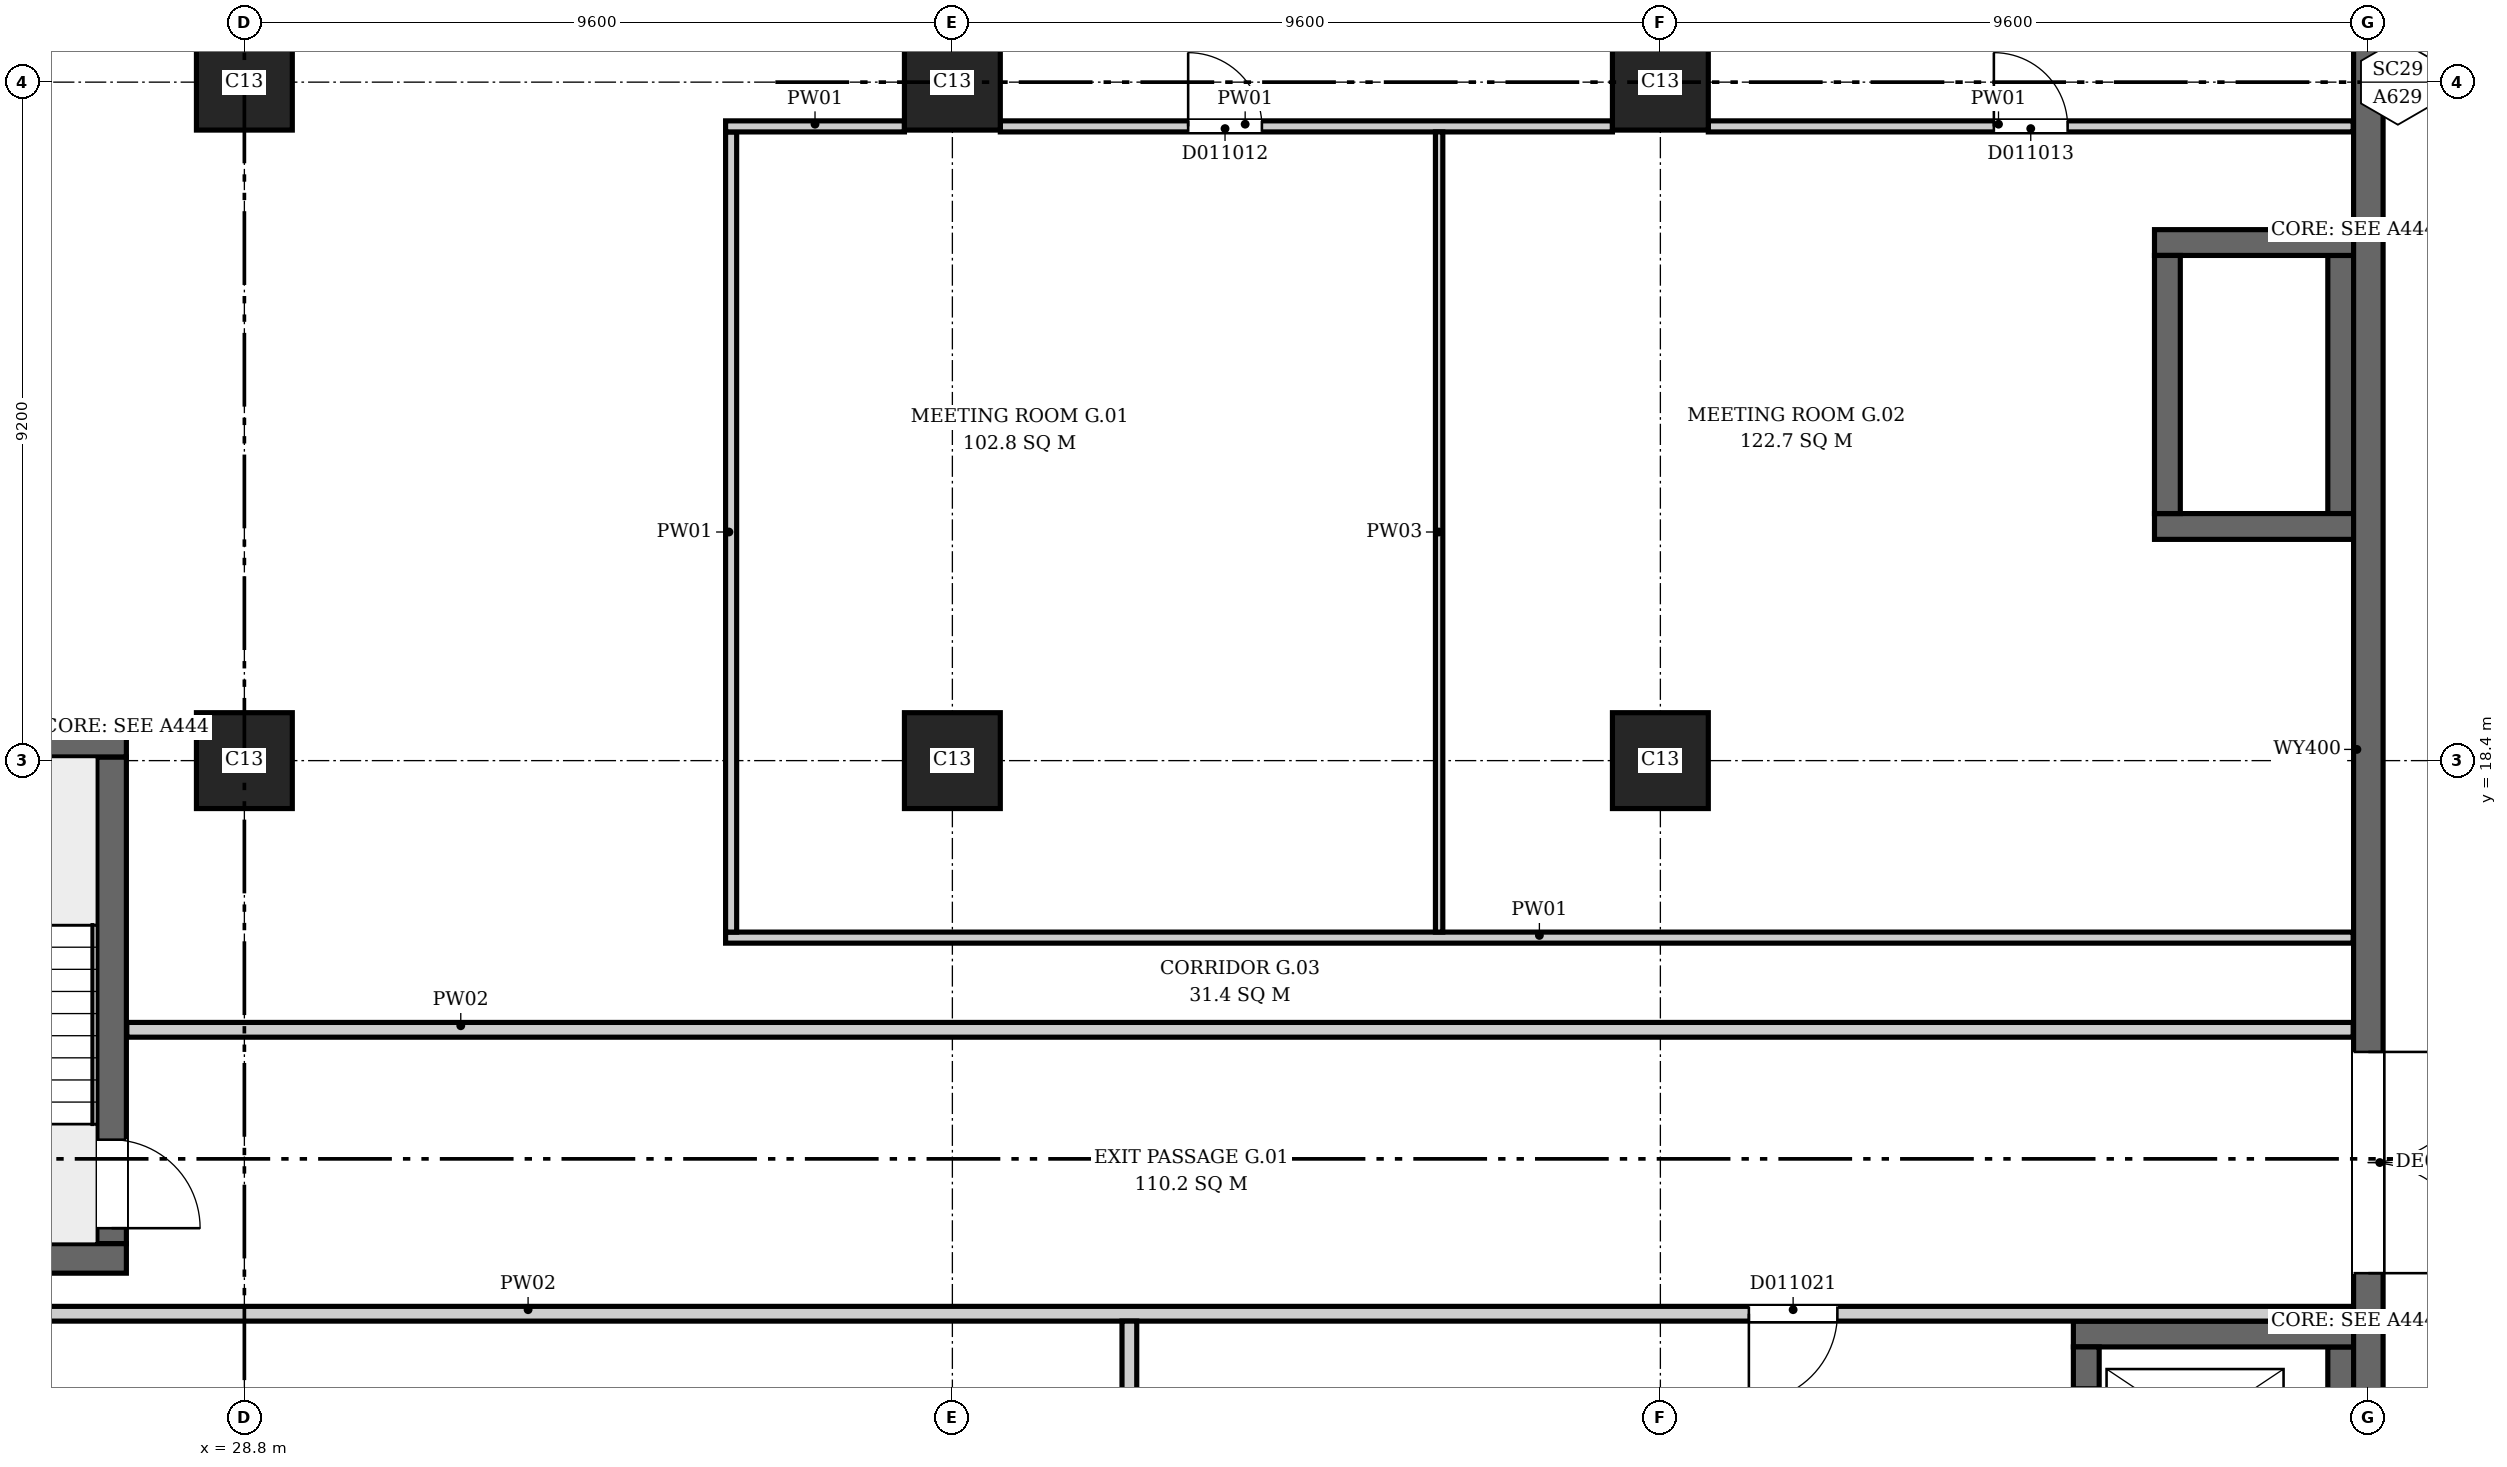
"""IFC4 building model, lengths in metres.
Left out: names, types, materials, properties, quantities, classifications, styles, units other than length and angle.
Written with IfcOpenShell. Run it as: python <this file> out.ifc"""

import sys

from ifc_helpers import new_model, si_unit, direction, frame, frame_2d, origin, origin_2d, place, context, subcontext, project, spatial, rectangle, extrude, element, fill, save


model = new_model("IFC4")
c1 = context("Model", 3, precision=1e-05, world=origin(), true_north=direction((0.0, 1.0)))
c2 = subcontext(c1, "Body", "Model", "MODEL_VIEW")
j1 = project(units=[si_unit("LENGTHUNIT", "METRE"), si_unit("PLANEANGLEUNIT", "RADIAN")], contexts=[c1])
p1 = place(None, origin())
s1 = spatial("IfcSite", under=j1, at=p1, CompositionType="ELEMENT")
p2 = place(p1, origin())
s2 = spatial("IfcBuilding", under=s1, at=p2, CompositionType="ELEMENT")
p3 = place(p2, origin())
s3 = spatial("IfcBuildingStorey", under=s2, at=p3, CompositionType="ELEMENT", Elevation=0.0)
p4 = place(p3, frame((57.6, -0.2, 0.0), z_axis=(0.0, 0.0, 1.0), x_axis=(0.0, 1.0, 0.0)))
e1 = element("IfcWall", 1, at=p4, inside=s3, PredefinedType="SHEAR", context=c2, shape_type="SweptSolid", body=[
    extrude(rectangle(XDim=46.88, YDim=0.4, at=frame_2d((23.44, 0.0))), origin(), (0.0, 0.0, 1.0), 6.5),
])
p5 = place(p4, frame((11.65, 0.0, 0.0)))
e2 = element("IfcOpeningElement", 2, at=p5, cuts=e1, PredefinedType="OPENING", context=c2, shape_type="SweptSolid", body=[
    extrude(rectangle(XDim=3.0, YDim=2.4, at=frame_2d((1.5, 1.2))), frame((0.0, 0.21, 0.0), z_axis=(0.0, -1.0, 0.0), x_axis=(1.0, 0.0, 0.0)), (0.0, 0.0, 1.0), 0.42),
])
p6 = place(p4, frame((38.2, 0.0, 0.0)))
e3 = element("IfcOpeningElement", 3, at=p6, cuts=e1, PredefinedType="OPENING", context=c2, shape_type="SweptSolid", body=[
    extrude(rectangle(XDim=3.0, YDim=2.4, at=frame_2d((1.5, 1.2))), frame((0.0, 0.21, 0.0), z_axis=(0.0, -1.0, 0.0), x_axis=(1.0, 0.0, 0.0)), (0.0, 0.0, 1.0), 0.42),
])
for number, where, z_axis, x_axis in (
    (4, (23.0, 11.65, 0.0), (0.0, 0.0, 1.0), (1.0, 0.0, 0.0)),
    (5, (23.0, 18.65, 0.0), (0.0, 0.0, 1.0), (1.0, 0.0, 0.0)),
):
    element("IfcWall", number, at=place(p3, frame(where, z_axis=z_axis, x_axis=x_axis)), inside=s3, PredefinedType="SHEAR", context=c2, shape_type="SweptSolid", body=[
        extrude(rectangle(XDim=4.2, YDim=0.4, at=frame_2d((2.1, 0.0))), origin(), (0.0, 0.0, 1.0), 6.5),
    ])
p7 = place(p3, frame((27.0, 11.85, 0.0), z_axis=(0.0, 0.0, 1.0), x_axis=(0.0, 1.0, 0.0)))
e6 = element("IfcWall", 6, at=p7, inside=s3, PredefinedType="SHEAR", context=c2, shape_type="SweptSolid", body=[
    extrude(rectangle(XDim=6.6, YDim=0.4, at=frame_2d((3.3, 0.0))), origin(), (0.0, 0.0, 1.0), 6.5),
])
p8 = place(p7, frame((0.21, 0.0, 0.0)))
e7 = element("IfcOpeningElement", 7, at=p8, cuts=e6, PredefinedType="OPENING", context=c2, shape_type="SweptSolid", body=[
    extrude(rectangle(XDim=1.2, YDim=2.1, at=frame_2d((0.6, 1.05))), frame((0.0, 0.21, 0.0), z_axis=(0.0, -1.0, 0.0), x_axis=(1.0, 0.0, 0.0)), (0.0, 0.0, 1.0), 0.42),
])
p9 = place(p3, frame((53.6, 10.625, 0.0), z_axis=(0.0, 0.0, 1.0), x_axis=(1.0, 0.0, 0.0)))
e8 = element("IfcWall", 8, at=p9, inside=s3, PredefinedType="SHEAR", context=c2, shape_type="SweptSolid", body=[
    extrude(rectangle(XDim=3.8, YDim=0.35, at=frame_2d((1.9, 0.0))), origin(), (0.0, 0.0, 1.0), 6.5),
])
p10 = place(p3, frame((53.775, 8.25, 0.0), z_axis=(0.0, 0.0, 1.0), x_axis=(0.0, 1.0, 0.0)))
e9 = element("IfcWall", 9, at=p10, inside=s3, PredefinedType="SHEAR", context=c2, shape_type="SweptSolid", body=[
    extrude(rectangle(XDim=2.2, YDim=0.35, at=frame_2d((1.1, 0.0))), origin(), (0.0, 0.0, 1.0), 6.5),
])
p11 = place(p10, frame((0.55, 0.0, 0.0)))
e10 = element("IfcOpeningElement", 10, at=p11, cuts=e9, PredefinedType="OPENING", context=c2, shape_type="SweptSolid", body=[
    extrude(rectangle(XDim=1.1, YDim=2.1, at=frame_2d((0.55, 1.05))), frame((0.0, 0.185, 0.0), z_axis=(0.0, -1.0, 0.0), x_axis=(1.0, 0.0, 0.0)), (0.0, 0.0, 1.0), 0.37),
])
p12 = place(p3, frame((57.225, 8.25, 0.0), z_axis=(0.0, 0.0, 1.0), x_axis=(0.0, 1.0, 0.0)))
e11 = element("IfcWall", 11, at=p12, inside=s3, PredefinedType="SHEAR", context=c2, shape_type="SweptSolid", body=[
    extrude(rectangle(XDim=2.2, YDim=0.35, at=frame_2d((1.1, 0.0))), origin(), (0.0, 0.0, 1.0), 6.5),
])
for number, where, z_axis, x_axis in (
    (12, (54.7, 21.575, 0.0), (0.0, 0.0, 1.0), (1.0, 0.0, 0.0)),
    (13, (54.7, 25.425, 0.0), (0.0, 0.0, 1.0), (1.0, 0.0, 0.0)),
):
    element("IfcWall", number, at=place(p3, frame(where, z_axis=z_axis, x_axis=x_axis)), inside=s3, PredefinedType="SHEAR", context=c2, shape_type="SweptSolid", body=[
        extrude(rectangle(XDim=2.7, YDim=0.35, at=frame_2d((1.35, 0.0))), origin(), (0.0, 0.0, 1.0), 6.5),
    ])
for number, where, z_axis, x_axis in (
    (14, (54.875, 21.75, 0.0), (0.0, 0.0, 1.0), (0.0, 1.0, 0.0)),
    (15, (57.225, 21.75, 0.0), (0.0, 0.0, 1.0), (0.0, 1.0, 0.0)),
):
    element("IfcWall", number, at=place(p3, frame(where, z_axis=z_axis, x_axis=x_axis)), inside=s3, PredefinedType="SHEAR", context=c2, shape_type="SweptSolid", body=[
        extrude(rectangle(XDim=3.5, YDim=0.35, at=frame_2d((1.75, 0.0))), origin(), (0.0, 0.0, 1.0), 6.5),
    ])
for number, where, z_axis, x_axis in (
    (16, (28.8, 18.4, 0.0), (0.0, 0.0, 1.0), (1.0, 0.0, 0.0)),
    (17, (38.4, 18.4, 0.0), (0.0, 0.0, 1.0), (1.0, 0.0, 0.0)),
    (18, (48.0, 18.4, 0.0), (0.0, 0.0, 1.0), (1.0, 0.0, 0.0)),
    (19, (28.8, 27.6, 0.0), (0.0, 0.0, 1.0), (1.0, 0.0, 0.0)),
    (20, (38.4, 27.6, 0.0), (0.0, 0.0, 1.0), (1.0, 0.0, 0.0)),
    (21, (48.0, 27.6, 0.0), (0.0, 0.0, 1.0), (1.0, 0.0, 0.0)),
):
    element("IfcColumn", number, at=place(p3, frame(where, z_axis=z_axis, x_axis=x_axis)), inside=s3, PredefinedType="COLUMN", context=c2, shape_type="SweptSolid", body=[
        extrude(rectangle(XDim=1.3, YDim=1.3, at=origin_2d()), origin(), (0.0, 0.0, 1.0), 6.5),
    ])
p13 = place(p3, frame((7.9, 10.9, 0.0), z_axis=(0.0, 0.0, 1.0), x_axis=(1.0, 0.0, 0.0)))
e22 = element("IfcWall", 22, at=p13, inside=s3, PredefinedType="PARTITIONING", context=c2, shape_type="SweptSolid", body=[
    extrude(rectangle(XDim=49.494, YDim=0.2, at=frame_2d((24.747, 0.0))), origin(), (0.0, 0.0, 1.0), 6.15),
])
p14 = place(p13, frame((41.3, 0.0, 0.0)))
e23 = element("IfcOpeningElement", 23, at=p14, cuts=e22, PredefinedType="OPENING", context=c2, shape_type="SweptSolid", body=[
    extrude(rectangle(XDim=1.2, YDim=2.1, at=frame_2d((0.6, 1.05))), frame((0.0, 0.11, 0.0), z_axis=(0.0, -1.0, 0.0), x_axis=(1.0, 0.0, 0.0)), (0.0, 0.0, 1.0), 0.22),
])
p15 = place(p3, frame((27.206, 14.75, 0.0), z_axis=(0.0, 0.0, 1.0), x_axis=(1.0, 0.0, 0.0)))
e24 = element("IfcWall", 24, at=p15, inside=s3, PredefinedType="PARTITIONING", context=c2, shape_type="SweptSolid", body=[
    extrude(rectangle(XDim=30.188, YDim=0.2, at=frame_2d((15.094, 0.0))), origin(), (0.0, 0.0, 1.0), 6.15),
])
p16 = place(p3, frame((35.325, 16.0, 0.0), z_axis=(0.0, 0.0, 1.0), x_axis=(1.0, 0.0, 0.0)))
e25 = element("IfcWall", 25, at=p16, inside=s3, PredefinedType="PARTITIONING", context=c2, shape_type="SweptSolid", body=[
    extrude(rectangle(XDim=22.069, YDim=0.15, at=frame_2d((11.035, 0.0))), origin(), (0.0, 0.0, 1.0), 6.15),
])
p17 = place(p3, frame((35.4, 16.075, 0.0), z_axis=(0.0, 0.0, 1.0), x_axis=(0.0, 1.0, 0.0)))
e26 = element("IfcWall", 26, at=p17, inside=s3, PredefinedType="PARTITIONING", context=c2, shape_type="SweptSolid", body=[
    extrude(rectangle(XDim=10.85, YDim=0.15, at=frame_2d((5.425, 0.0))), origin(), (0.0, 0.0, 1.0), 6.15),
])
p18 = place(p3, frame((35.325, 27.0, 0.0), z_axis=(0.0, 0.0, 1.0), x_axis=(1.0, 0.0, 0.0)))
e27 = element("IfcWall", 27, at=p18, inside=s3, PredefinedType="PARTITIONING", context=c2, shape_type="SweptSolid", body=[
    extrude(rectangle(XDim=2.425, YDim=0.15, at=frame_2d((1.212, 0.0))), origin(), (0.0, 0.0, 1.0), 6.15),
])
p19 = place(p3, frame((39.05, 27.0, 0.0), z_axis=(0.0, 0.0, 1.0), x_axis=(1.0, 0.0, 0.0)))
e28 = element("IfcWall", 28, at=p19, inside=s3, PredefinedType="PARTITIONING", context=c2, shape_type="SweptSolid", body=[
    extrude(rectangle(XDim=8.3, YDim=0.15, at=frame_2d((4.15, 0.0))), origin(), (0.0, 0.0, 1.0), 6.15),
])
p20 = place(p19, frame((2.547, 0.0, 0.0)))
e29 = element("IfcOpeningElement", 29, at=p20, cuts=e28, PredefinedType="OPENING", context=c2, shape_type="SweptSolid", body=[
    extrude(rectangle(XDim=1.0, YDim=2.1, at=frame_2d((0.5, 1.05))), frame((0.0, 0.085, 0.0), z_axis=(0.0, -1.0, 0.0), x_axis=(1.0, 0.0, 0.0)), (0.0, 0.0, 1.0), 0.17),
])
p21 = place(p3, frame((40.8, 0.206, 0.0), z_axis=(0.0, 0.0, 1.0), x_axis=(0.0, 1.0, 0.0)))
e30 = element("IfcWall", 30, at=p21, inside=s3, PredefinedType="PARTITIONING", context=c2, shape_type="SweptSolid", body=[
    extrude(rectangle(XDim=10.594, YDim=0.2, at=frame_2d((5.297, 0.0))), origin(), (0.0, 0.0, 1.0), 6.15),
])
p22 = place(p21, frame((6.894, 0.0, 0.0)))
e31 = element("IfcOpeningElement", 31, at=p22, cuts=e30, PredefinedType="OPENING", context=c2, shape_type="SweptSolid", body=[
    extrude(rectangle(XDim=1.8, YDim=2.1, at=frame_2d((0.9, 1.05))), frame((0.0, 0.11, 0.0), z_axis=(0.0, -1.0, 0.0), x_axis=(1.0, 0.0, 0.0)), (0.0, 0.0, 1.0), 0.22),
])
p23 = place(p3, frame((45.0, 16.075, 0.0), z_axis=(0.0, 0.0, 1.0), x_axis=(0.0, 1.0, 0.0)))
e32 = element("IfcWall", 32, at=p23, inside=s3, PredefinedType="PARTITIONING", context=c2, shape_type="SweptSolid", body=[
    extrude(rectangle(XDim=10.85, YDim=0.1, at=frame_2d((5.425, 0.0))), origin(), (0.0, 0.0, 1.0), 6.15),
])
p24 = place(p3, frame((48.65, 27.0, 0.0), z_axis=(0.0, 0.0, 1.0), x_axis=(1.0, 0.0, 0.0)))
e33 = element("IfcWall", 33, at=p24, inside=s3, PredefinedType="PARTITIONING", context=c2, shape_type="SweptSolid", body=[
    extrude(rectangle(XDim=8.744, YDim=0.15, at=frame_2d((4.372, 0.0))), origin(), (0.0, 0.0, 1.0), 6.15),
])
p25 = place(p24, frame((3.872, 0.0, 0.0)))
e34 = element("IfcOpeningElement", 34, at=p25, cuts=e33, PredefinedType="OPENING", context=c2, shape_type="SweptSolid", body=[
    extrude(rectangle(XDim=1.0, YDim=2.1, at=frame_2d((0.5, 1.05))), frame((0.0, 0.085, 0.0), z_axis=(0.0, -1.0, 0.0), x_axis=(1.0, 0.0, 0.0)), (0.0, 0.0, 1.0), 0.17),
])
p26 = place(p5, frame((3.0, 0.0, 0.0), z_axis=(0.0, 0.0, 1.0), x_axis=(-1.0, 0.0, 0.0)))
e35 = element("IfcDoor", 35, at=p26, inside=s3, OperationType="DOUBLE_DOOR_SINGLE_SWING", PredefinedType="DOOR", context=c2, shape_type="SweptSolid", body=[
    extrude(rectangle(XDim=3.0, YDim=2.4, at=frame_2d((1.5, 1.2))), frame((0.0, 0.025, 0.0), z_axis=(0.0, -1.0, 0.0), x_axis=(1.0, 0.0, 0.0)), (0.0, 0.0, 1.0), 0.05),
])
fill(e2, e35)
p27 = place(p8, origin())
e36 = element("IfcDoor", 36, at=p27, inside=s3, OperationType="SINGLE_SWING_LEFT", PredefinedType="DOOR", context=c2, shape_type="SweptSolid", body=[
    extrude(rectangle(XDim=1.2, YDim=2.1, at=frame_2d((0.6, 1.05))), frame((0.0, 0.025, 0.0), z_axis=(0.0, -1.0, 0.0), x_axis=(1.0, 0.0, 0.0)), (0.0, 0.0, 1.0), 0.05),
])
fill(e7, e36)
p28 = place(p11, origin())
e37 = element("IfcDoor", 37, at=p28, inside=s3, OperationType="DOUBLE_DOOR_SLIDING", PredefinedType="DOOR", context=c2, shape_type="SweptSolid", body=[
    extrude(rectangle(XDim=1.1, YDim=2.1, at=frame_2d((0.55, 1.05))), frame((0.0, 0.025, 0.0), z_axis=(0.0, -1.0, 0.0), x_axis=(1.0, 0.0, 0.0)), (0.0, 0.0, 1.0), 0.05),
])
fill(e10, e37)
p29 = place(p20, origin())
e38 = element("IfcDoor", 38, at=p29, inside=s3, OperationType="SINGLE_SWING_LEFT", PredefinedType="DOOR", context=c2, shape_type="SweptSolid", body=[
    extrude(rectangle(XDim=1.0, YDim=2.1, at=frame_2d((0.5, 1.05))), frame((0.0, 0.025, 0.0), z_axis=(0.0, -1.0, 0.0), x_axis=(1.0, 0.0, 0.0)), (0.0, 0.0, 1.0), 0.05),
])
fill(e29, e38)
p30 = place(p25, origin())
e39 = element("IfcDoor", 39, at=p30, inside=s3, OperationType="SINGLE_SWING_LEFT", PredefinedType="DOOR", context=c2, shape_type="SweptSolid", body=[
    extrude(rectangle(XDim=1.0, YDim=2.1, at=frame_2d((0.5, 1.05))), frame((0.0, 0.025, 0.0), z_axis=(0.0, -1.0, 0.0), x_axis=(1.0, 0.0, 0.0)), (0.0, 0.0, 1.0), 0.05),
])
fill(e34, e39)
p31 = place(p14, origin())
e40 = element("IfcDoor", 40, at=p31, inside=s3, OperationType="SINGLE_SWING_LEFT", PredefinedType="DOOR", context=c2, shape_type="SweptSolid", body=[
    extrude(rectangle(XDim=1.2, YDim=2.1, at=frame_2d((0.6, 1.05))), frame((0.0, 0.025, 0.0), z_axis=(0.0, -1.0, 0.0), x_axis=(1.0, 0.0, 0.0)), (0.0, 0.0, 1.0), 0.05),
])
fill(e23, e40)
save(model, sys.argv[1])
